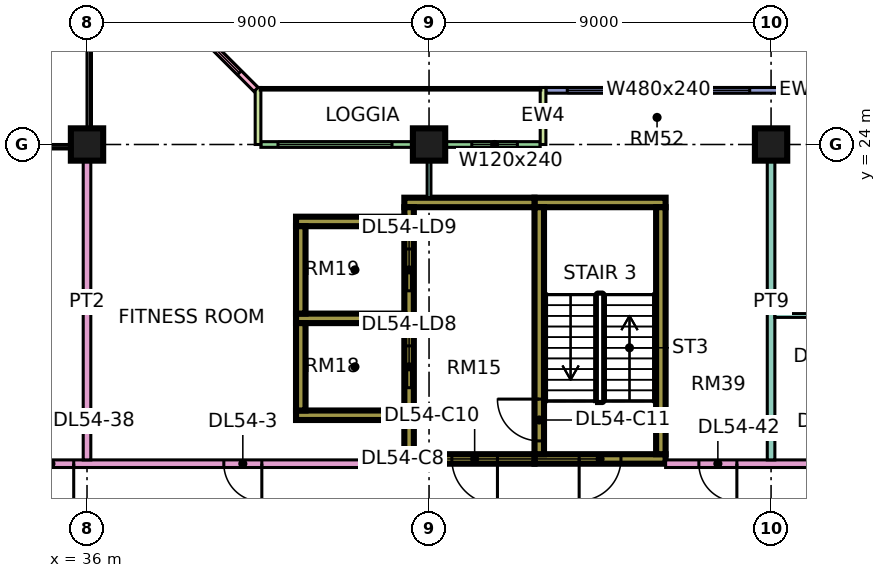
"""IFC4 building model, lengths in metres.
Left out: names, types, materials, properties, quantities, classifications, styles, units other than length and angle.
Written with IfcOpenShell. Run it as: python <this file> out.ifc"""

import sys

from ifc_helpers import new_model, si_unit, direction, frame, frame_2d, origin, origin_2d, place, context, subcontext, project, spatial, rectangle, extrude, element, fill, save


model = new_model("IFC4")
c1 = context("Model", 3, precision=1e-05, world=origin(), true_north=direction((0.0, 1.0)))
c2 = subcontext(c1, "Body", "Model", "MODEL_VIEW")
j1 = project(units=[si_unit("LENGTHUNIT", "METRE"), si_unit("PLANEANGLEUNIT", "RADIAN")], contexts=[c1])
p1 = place(None, origin())
s1 = spatial("IfcSite", under=j1, at=p1, CompositionType="ELEMENT")
p2 = place(p1, origin())
s2 = spatial("IfcBuilding", under=s1, at=p2, CompositionType="ELEMENT")
p3 = place(p2, frame((0.0, 0.0, 230.4)))
s3 = spatial("IfcBuildingStorey", under=s2, at=p3, CompositionType="ELEMENT", Elevation=230.4)
for number, where, z_axis, x_axis in (
    (1, (36.0, 24.0, 0.0), (0.0, 0.0, 1.0), (1.0, 0.0, 0.0)),
    (2, (45.0, 24.0, 0.0), (0.0, 0.0, 1.0), (1.0, 0.0, 0.0)),
    (3, (54.0, 24.0, 0.0), (0.0, 0.0, 1.0), (1.0, 0.0, 0.0)),
):
    element("IfcColumn", number, at=place(p3, frame(where, z_axis=z_axis, x_axis=x_axis)), inside=s3, PredefinedType="COLUMN", context=c2, shape_type="SweptSolid", body=[
        extrude(rectangle(XDim=0.85, YDim=0.85, at=origin_2d()), origin(), (0.0, 0.0, 1.0), 3.75),
    ])
p4 = place(p3, frame((47.775, 15.725, 0.0), z_axis=(0.0, 0.0, 1.0), x_axis=(1.0, 0.0, 0.0)))
e4 = element("IfcWall", 4, at=p4, inside=s3, PredefinedType="SHEAR", context=c2, shape_type="SweptSolid", body=[
    extrude(rectangle(XDim=3.45, YDim=0.25, at=frame_2d((1.725, 0.0))), origin(), (0.0, 0.0, 1.0), 3.75),
])
p5 = place(p4, frame((1.175, 0.0, 0.0)))
e5 = element("IfcOpeningElement", 5, at=p5, cuts=e4, PredefinedType="OPENING", context=c2, shape_type="SweptSolid", body=[
    extrude(rectangle(XDim=1.1, YDim=2.2, at=frame_2d((0.55, 1.1))), frame((0.0, 0.135, 0.0), z_axis=(0.0, -1.0, 0.0), x_axis=(1.0, 0.0, 0.0)), (0.0, 0.0, 1.0), 0.27),
])
p6 = place(p3, frame((47.775, 22.475, 0.0), z_axis=(0.0, 0.0, 1.0), x_axis=(1.0, 0.0, 0.0)))
e6 = element("IfcWall", 6, at=p6, inside=s3, PredefinedType="SHEAR", context=c2, shape_type="SweptSolid", body=[
    extrude(rectangle(XDim=3.45, YDim=0.25, at=frame_2d((1.725, 0.0))), origin(), (0.0, 0.0, 1.0), 3.75),
])
p7 = place(p3, frame((47.9, 15.85, 0.0), z_axis=(0.0, 0.0, 1.0), x_axis=(0.0, 1.0, 0.0)))
e7 = element("IfcWall", 7, at=p7, inside=s3, PredefinedType="SHEAR", context=c2, shape_type="SweptSolid", body=[
    extrude(rectangle(XDim=6.5, YDim=0.25, at=frame_2d((3.25, 0.0))), origin(), (0.0, 0.0, 1.0), 3.75),
])
p8 = place(p7, frame((0.35, 0.0, 0.0)))
e8 = element("IfcOpeningElement", 8, at=p8, cuts=e7, PredefinedType="OPENING", context=c2, shape_type="SweptSolid", body=[
    extrude(rectangle(XDim=1.1, YDim=2.2, at=frame_2d((0.55, 1.1))), frame((0.0, 0.135, 0.0), z_axis=(0.0, -1.0, 0.0), x_axis=(1.0, 0.0, 0.0)), (0.0, 0.0, 1.0), 0.27),
])
p9 = place(p3, frame((51.1, 15.85, 0.0), z_axis=(0.0, 0.0, 1.0), x_axis=(0.0, 1.0, 0.0)))
e9 = element("IfcWall", 9, at=p9, inside=s3, PredefinedType="SHEAR", context=c2, shape_type="SweptSolid", body=[
    extrude(rectangle(XDim=6.5, YDim=0.25, at=frame_2d((3.25, 0.0))), origin(), (0.0, 0.0, 1.0), 3.75),
])
p10 = place(p3, frame((44.35, 15.725, 0.0), z_axis=(0.0, 0.0, 1.0), x_axis=(1.0, 0.0, 0.0)))
e10 = element("IfcWall", 10, at=p10, inside=s3, PredefinedType="SHEAR", context=c2, shape_type="SweptSolid", body=[
    extrude(rectangle(XDim=3.425, YDim=0.25, at=frame_2d((1.712, 0.0))), origin(), (0.0, 0.0, 1.0), 3.75),
])
p11 = place(p10, frame((1.25, 0.0, 0.0)))
e11 = element("IfcOpeningElement", 11, at=p11, cuts=e10, PredefinedType="OPENING", context=c2, shape_type="SweptSolid", body=[
    extrude(rectangle(XDim=1.2, YDim=2.2, at=frame_2d((0.6, 1.1))), frame((0.0, 0.135, 0.0), z_axis=(0.0, -1.0, 0.0), x_axis=(1.0, 0.0, 0.0)), (0.0, 0.0, 1.0), 0.27),
])
p12 = place(p3, frame((44.35, 22.475, 0.0), z_axis=(0.0, 0.0, 1.0), x_axis=(1.0, 0.0, 0.0)))
e12 = element("IfcWall", 12, at=p12, inside=s3, PredefinedType="SHEAR", context=c2, shape_type="SweptSolid", body=[
    extrude(rectangle(XDim=3.425, YDim=0.25, at=frame_2d((1.712, 0.0))), origin(), (0.0, 0.0, 1.0), 3.75),
])
p13 = place(p3, frame((44.475, 15.85, 0.0), z_axis=(0.0, 0.0, 1.0), x_axis=(0.0, 1.0, 0.0)))
e13 = element("IfcWall", 13, at=p13, inside=s3, PredefinedType="SHEAR", context=c2, shape_type="SweptSolid", body=[
    extrude(rectangle(XDim=6.5, YDim=0.25, at=frame_2d((3.25, 0.0))), origin(), (0.0, 0.0, 1.0), 3.75),
])
p14 = place(p13, frame((1.75, 0.0, 0.0)))
e14 = element("IfcOpeningElement", 14, at=p14, cuts=e13, PredefinedType="OPENING", context=c2, shape_type="SweptSolid", body=[
    extrude(rectangle(XDim=1.1, YDim=2.2, at=frame_2d((0.55, 1.1))), frame((0.0, 0.135, 0.0), z_axis=(0.0, -1.0, 0.0), x_axis=(1.0, 0.0, 0.0)), (0.0, 0.0, 1.0), 0.27),
])
p15 = place(p13, frame((4.3, 0.0, 0.0)))
e15 = element("IfcOpeningElement", 15, at=p15, cuts=e13, PredefinedType="OPENING", context=c2, shape_type="SweptSolid", body=[
    extrude(rectangle(XDim=1.1, YDim=2.2, at=frame_2d((0.55, 1.1))), frame((0.0, 0.135, 0.0), z_axis=(0.0, -1.0, 0.0), x_axis=(1.0, 0.0, 0.0)), (0.0, 0.0, 1.0), 0.27),
])
for number, where, z_axis, x_axis in (
    (16, (41.5, 16.875, 0.0), (0.0, 0.0, 1.0), (1.0, 0.0, 0.0)),
    (17, (41.5, 19.425, 0.0), (0.0, 0.0, 1.0), (1.0, 0.0, 0.0)),
    (18, (41.5, 21.975, 0.0), (0.0, 0.0, 1.0), (1.0, 0.0, 0.0)),
):
    element("IfcWall", number, at=place(p3, frame(where, z_axis=z_axis, x_axis=x_axis)), inside=s3, PredefinedType="SHEAR", context=c2, shape_type="SweptSolid", body=[
        extrude(rectangle(XDim=2.85, YDim=0.25, at=frame_2d((1.425, 0.0))), origin(), (0.0, 0.0, 1.0), 3.75),
    ])
for number, where, z_axis, x_axis in (
    (19, (41.625, 17.0, 0.0), (0.0, 0.0, 1.0), (0.0, 1.0, 0.0)),
    (20, (41.625, 19.55, 0.0), (0.0, 0.0, 1.0), (0.0, 1.0, 0.0)),
):
    element("IfcWall", number, at=place(p3, frame(where, z_axis=z_axis, x_axis=x_axis)), inside=s3, PredefinedType="SHEAR", context=c2, shape_type="SweptSolid", body=[
        extrude(rectangle(XDim=2.3, YDim=0.25, at=frame_2d((1.15, 0.0))), origin(), (0.0, 0.0, 1.0), 3.75),
    ])
p16 = place(p3, frame((61.5, 25.425, 0.0), z_axis=(0.0, 0.0, 1.0), x_axis=(-1.0, 0.0, 0.0)))
e21 = element("IfcWall", 21, at=p16, inside=s3, PredefinedType="SOLIDWALL", context=c2, shape_type="SweptSolid", body=[
    extrude(rectangle(XDim=13.425, YDim=0.15, at=frame_2d((6.712, 0.0))), origin(), (0.0, 0.0, 1.0), 3.35),
])
p17 = place(p16, frame((2.1, 0.0, 0.45)))
e22 = element("IfcOpeningElement", 22, at=p17, cuts=e21, PredefinedType="OPENING", context=c2, shape_type="SweptSolid", body=[
    extrude(rectangle(XDim=1.8, YDim=2.4, at=frame_2d((0.9, 1.2))), frame((0.0, 0.085, 0.0), z_axis=(0.0, -1.0, 0.0), x_axis=(1.0, 0.0, 0.0)), (0.0, 0.0, 1.0), 0.17),
])
p18 = place(p16, frame((5.1, 0.0, 0.45)))
e23 = element("IfcOpeningElement", 23, at=p18, cuts=e21, PredefinedType="OPENING", context=c2, shape_type="SweptSolid", body=[
    extrude(rectangle(XDim=1.8, YDim=2.4, at=frame_2d((0.9, 1.2))), frame((0.0, 0.085, 0.0), z_axis=(0.0, -1.0, 0.0), x_axis=(1.0, 0.0, 0.0)), (0.0, 0.0, 1.0), 0.17),
])
p19 = place(p16, frame((8.062, 0.0, 0.45)))
e24 = element("IfcOpeningElement", 24, at=p19, cuts=e21, PredefinedType="OPENING", context=c2, shape_type="SweptSolid", body=[
    extrude(rectangle(XDim=4.8, YDim=2.4, at=frame_2d((2.4, 1.2))), frame((0.0, 0.085, 0.0), z_axis=(0.0, -1.0, 0.0), x_axis=(1.0, 0.0, 0.0)), (0.0, 0.0, 1.0), 0.17),
])
p20 = place(p3, frame((47.925, 24.0, 0.0), z_axis=(0.0, 0.0, 1.0), x_axis=(-1.0, 0.0, 0.0)))
e25 = element("IfcWall", 25, at=p20, inside=s3, PredefinedType="SOLIDWALL", context=c2, shape_type="SweptSolid", body=[
    extrude(rectangle(XDim=7.35, YDim=0.15, at=frame_2d((3.675, 0.0))), origin(), (0.0, 0.0, 1.0), 3.35),
])
p21 = place(p20, frame((0.6, 0.0, 0.45)))
e26 = element("IfcOpeningElement", 26, at=p21, cuts=e25, PredefinedType="OPENING", context=c2, shape_type="SweptSolid", body=[
    extrude(rectangle(XDim=1.2, YDim=2.4, at=frame_2d((0.6, 1.2))), frame((0.0, 0.085, 0.0), z_axis=(0.0, -1.0, 0.0), x_axis=(1.0, 0.0, 0.0)), (0.0, 0.0, 1.0), 0.17),
])
p22 = place(p20, frame((3.9, 0.0, 0.45)))
e27 = element("IfcOpeningElement", 27, at=p22, cuts=e25, PredefinedType="OPENING", context=c2, shape_type="SweptSolid", body=[
    extrude(rectangle(XDim=3.0, YDim=2.4, at=frame_2d((1.5, 1.2))), frame((0.0, 0.085, 0.0), z_axis=(0.0, -1.0, 0.0), x_axis=(1.0, 0.0, 0.0)), (0.0, 0.0, 1.0), 0.17),
])
for number, where, z_axis, x_axis in (
    (28, (48.0, 25.5, 0.0), (0.0, 0.0, 1.0), (0.0, -1.0, 0.0)),
    (29, (40.5, 25.5, 0.0), (0.0, 0.0, 1.0), (0.0, -1.0, 0.0)),
):
    element("IfcWall", number, at=place(p3, frame(where, z_axis=z_axis, x_axis=x_axis)), inside=s3, PredefinedType="SOLIDWALL", context=c2, shape_type="SweptSolid", body=[
        extrude(rectangle(XDim=1.5, YDim=0.15, at=frame_2d((0.75, 0.0))), origin(), (0.0, 0.0, 1.0), 3.35),
    ])
p23 = place(p3, frame((40.447, 25.447, 0.0), z_axis=(0.0, 0.0, 1.0), x_axis=(-0.707106781187, 0.707106781187, 0.0)))
e30 = element("IfcWall", 30, at=p23, inside=s3, PredefinedType="SOLIDWALL", context=c2, shape_type="SweptSolid", body=[
    extrude(rectangle(XDim=4.243, YDim=0.15, at=frame_2d((2.121, 0.0))), origin(), (0.0, 0.0, 1.0), 3.35),
])
p24 = place(p23, frame((0.621, 0.0, 0.45)))
e31 = element("IfcOpeningElement", 31, at=p24, cuts=e30, PredefinedType="OPENING", context=c2, shape_type="SweptSolid", body=[
    extrude(rectangle(XDim=3.0, YDim=2.4, at=frame_2d((1.5, 1.2))), frame((0.0, 0.085, 0.0), z_axis=(0.0, -1.0, 0.0), x_axis=(1.0, 0.0, 0.0)), (0.0, 0.0, 1.0), 0.17),
])
p25 = place(p3, frame((34.0, 15.6, 0.0), z_axis=(0.0, 0.0, 1.0), x_axis=(1.0, 0.0, 0.0)))
e32 = element("IfcWall", 32, at=p25, inside=s3, PredefinedType="PARTITIONING", context=c2, shape_type="SweptSolid", body=[
    extrude(rectangle(XDim=10.35, YDim=0.2, at=frame_2d((5.175, 0.0))), origin(), (0.0, 0.0, 1.0), 3.35),
])
p26 = place(p25, frame((5.6, 0.0, 0.0)))
e33 = element("IfcOpeningElement", 33, at=p26, cuts=e32, PredefinedType="OPENING", context=c2, shape_type="SweptSolid", body=[
    extrude(rectangle(XDim=1.0, YDim=2.1, at=frame_2d((0.5, 1.05))), frame((0.0, 0.11, 0.0), z_axis=(0.0, -1.0, 0.0), x_axis=(1.0, 0.0, 0.0)), (0.0, 0.0, 1.0), 0.22),
])
p27 = place(p25, frame((0.45, 0.0, 0.0)))
e34 = element("IfcOpeningElement", 34, at=p27, cuts=e32, PredefinedType="OPENING", context=c2, shape_type="SweptSolid", body=[
    extrude(rectangle(XDim=1.2, YDim=2.1, at=frame_2d((0.6, 1.05))), frame((0.0, 0.11, 0.0), z_axis=(0.0, -1.0, 0.0), x_axis=(1.0, 0.0, 0.0)), (0.0, 0.0, 1.0), 0.22),
])
p28 = place(p3, frame((36.0, 15.7, 0.0), z_axis=(0.0, 0.0, 1.0), x_axis=(0.0, 1.0, 0.0)))
e35 = element("IfcWall", 35, at=p28, inside=s3, PredefinedType="PARTITIONING", context=c2, shape_type="SweptSolid", body=[
    extrude(rectangle(XDim=8.3, YDim=0.2, at=frame_2d((4.15, 0.0))), origin(), (0.0, 0.0, 1.0), 3.35),
])
p29 = place(p3, frame((45.0, 22.6, 0.0), z_axis=(0.0, 0.0, 1.0), x_axis=(0.0, 1.0, 0.0)))
e36 = element("IfcWall", 36, at=p29, inside=s3, PredefinedType="PARTITIONING", context=c2, shape_type="SweptSolid", body=[
    extrude(rectangle(XDim=1.326, YDim=0.1, at=frame_2d((0.663, 0.0))), origin(), (0.0, 0.0, 1.0), 3.35),
])
p30 = place(p3, frame((51.225, 15.6, 0.0), z_axis=(0.0, 0.0, 1.0), x_axis=(1.0, 0.0, 0.0)))
e37 = element("IfcWall", 37, at=p30, inside=s3, PredefinedType="PARTITIONING", context=c2, shape_type="SweptSolid", body=[
    extrude(rectangle(XDim=11.701, YDim=0.2, at=frame_2d((5.851, 0.0))), origin(), (0.0, 0.0, 1.0), 3.35),
])
p31 = place(p30, frame((3.875, 0.0, 0.0)))
e38 = element("IfcOpeningElement", 38, at=p31, cuts=e37, PredefinedType="OPENING", context=c2, shape_type="SweptSolid", body=[
    extrude(rectangle(XDim=1.0, YDim=2.1, at=frame_2d((0.5, 1.05))), frame((0.0, 0.11, 0.0), z_axis=(0.0, -1.0, 0.0), x_axis=(1.0, 0.0, 0.0)), (0.0, 0.0, 1.0), 0.22),
])
p32 = place(p30, frame((0.875, 0.0, 0.0)))
e39 = element("IfcOpeningElement", 39, at=p32, cuts=e37, PredefinedType="OPENING", context=c2, shape_type="SweptSolid", body=[
    extrude(rectangle(XDim=1.0, YDim=2.1, at=frame_2d((0.5, 1.05))), frame((0.0, 0.11, 0.0), z_axis=(0.0, -1.0, 0.0), x_axis=(1.0, 0.0, 0.0)), (0.0, 0.0, 1.0), 0.22),
])
p33 = place(p3, frame((54.0, 15.7, 0.0), z_axis=(0.0, 0.0, 1.0), x_axis=(0.0, 1.0, 0.0)))
e40 = element("IfcWall", 40, at=p33, inside=s3, PredefinedType="PARTITIONING", context=c2, shape_type="SweptSolid", body=[
    extrude(rectangle(XDim=8.3, YDim=0.2, at=frame_2d((4.15, 0.0))), origin(), (0.0, 0.0, 1.0), 3.35),
])
p34 = place(p3, frame((54.1, 19.5, 0.0), z_axis=(0.0, 0.0, 1.0), x_axis=(1.0, 0.0, 0.0)))
e41 = element("IfcWall", 41, at=p34, inside=s3, PredefinedType="PARTITIONING", context=c2, shape_type="SweptSolid", body=[
    extrude(rectangle(XDim=5.95, YDim=0.1, at=frame_2d((2.975, 0.0))), origin(), (0.0, 0.0, 1.0), 3.35),
])
p35 = place(p34, frame((0.95, 0.0, 0.0)))
e42 = element("IfcOpeningElement", 42, at=p35, cuts=e41, PredefinedType="OPENING", context=c2, shape_type="SweptSolid", body=[
    extrude(rectangle(XDim=0.9, YDim=2.1, at=frame_2d((0.45, 1.05))), frame((0.0, 0.06, 0.0), z_axis=(0.0, -1.0, 0.0), x_axis=(1.0, 0.0, 0.0)), (0.0, 0.0, 1.0), 0.12),
])
p36 = place(p34, frame((3.95, 0.0, 0.0)))
e43 = element("IfcOpeningElement", 43, at=p36, cuts=e41, PredefinedType="OPENING", context=c2, shape_type="SweptSolid", body=[
    extrude(rectangle(XDim=0.9, YDim=2.1, at=frame_2d((0.45, 1.05))), frame((0.0, 0.06, 0.0), z_axis=(0.0, -1.0, 0.0), x_axis=(1.0, 0.0, 0.0)), (0.0, 0.0, 1.0), 0.12),
])
p37 = place(p18, origin())
e44 = element("IfcWindow", 44, at=p37, inside=s3, PartitioningType="SINGLE_PANEL", PredefinedType="WINDOW", context=c2, shape_type="SweptSolid", body=[
    extrude(rectangle(XDim=1.8, YDim=2.4, at=frame_2d((0.9, 1.2))), frame((0.0, 0.03, 0.0), z_axis=(0.0, -1.0, 0.0), x_axis=(1.0, 0.0, 0.0)), (0.0, 0.0, 1.0), 0.06),
])
fill(e23, e44)
p38 = place(p19, origin())
e45 = element("IfcWindow", 45, at=p38, inside=s3, PartitioningType="SINGLE_PANEL", PredefinedType="WINDOW", context=c2, shape_type="SweptSolid", body=[
    extrude(rectangle(XDim=4.8, YDim=2.4, at=frame_2d((2.4, 1.2))), frame((0.0, 0.03, 0.0), z_axis=(0.0, -1.0, 0.0), x_axis=(1.0, 0.0, 0.0)), (0.0, 0.0, 1.0), 0.06),
])
fill(e24, e45)
p39 = place(p21, origin())
e46 = element("IfcWindow", 46, at=p39, inside=s3, PartitioningType="SINGLE_PANEL", PredefinedType="WINDOW", context=c2, shape_type="SweptSolid", body=[
    extrude(rectangle(XDim=1.2, YDim=2.4, at=frame_2d((0.6, 1.2))), frame((0.0, 0.03, 0.0), z_axis=(0.0, -1.0, 0.0), x_axis=(1.0, 0.0, 0.0)), (0.0, 0.0, 1.0), 0.06),
])
fill(e26, e46)
p40 = place(p22, origin())
e47 = element("IfcWindow", 47, at=p40, inside=s3, PartitioningType="SINGLE_PANEL", PredefinedType="WINDOW", context=c2, shape_type="SweptSolid", body=[
    extrude(rectangle(XDim=3.0, YDim=2.4, at=frame_2d((1.5, 1.2))), frame((0.0, 0.03, 0.0), z_axis=(0.0, -1.0, 0.0), x_axis=(1.0, 0.0, 0.0)), (0.0, 0.0, 1.0), 0.06),
])
fill(e27, e47)
p41 = place(p24, origin())
e48 = element("IfcWindow", 48, at=p41, inside=s3, PartitioningType="SINGLE_PANEL", PredefinedType="WINDOW", context=c2, shape_type="SweptSolid", body=[
    extrude(rectangle(XDim=3.0, YDim=2.4, at=frame_2d((1.5, 1.2))), frame((0.0, 0.03, 0.0), z_axis=(0.0, -1.0, 0.0), x_axis=(1.0, 0.0, 0.0)), (0.0, 0.0, 1.0), 0.06),
])
fill(e31, e48)
p42 = place(p5, frame((1.1, 0.0, 0.0), z_axis=(0.0, 0.0, 1.0), x_axis=(-1.0, 0.0, 0.0)))
e49 = element("IfcDoor", 49, at=p42, inside=s3, OperationType="SINGLE_SWING_LEFT", PredefinedType="DOOR", context=c2, shape_type="SweptSolid", body=[
    extrude(rectangle(XDim=1.1, YDim=2.2, at=frame_2d((0.55, 1.1))), frame((0.0, 0.025, 0.0), z_axis=(0.0, -1.0, 0.0), x_axis=(1.0, 0.0, 0.0)), (0.0, 0.0, 1.0), 0.05),
])
fill(e5, e49)
p43 = place(p11, origin())
e50 = element("IfcDoor", 50, at=p43, inside=s3, OperationType="SINGLE_SWING_RIGHT", PredefinedType="DOOR", context=c2, shape_type="SweptSolid", body=[
    extrude(rectangle(XDim=1.2, YDim=2.2, at=frame_2d((0.6, 1.1))), frame((0.0, 0.025, 0.0), z_axis=(0.0, -1.0, 0.0), x_axis=(1.0, 0.0, 0.0)), (0.0, 0.0, 1.0), 0.05),
])
fill(e11, e50)
p44 = place(p8, frame((1.1, 0.0, 0.0), z_axis=(0.0, 0.0, 1.0), x_axis=(-1.0, 0.0, 0.0)))
e51 = element("IfcDoor", 51, at=p44, inside=s3, OperationType="SINGLE_SWING_RIGHT", PredefinedType="DOOR", context=c2, shape_type="SweptSolid", body=[
    extrude(rectangle(XDim=1.1, YDim=2.2, at=frame_2d((0.55, 1.1))), frame((0.0, 0.025, 0.0), z_axis=(0.0, -1.0, 0.0), x_axis=(1.0, 0.0, 0.0)), (0.0, 0.0, 1.0), 0.05),
])
fill(e8, e51)
p45 = place(p14, origin())
e52 = element("IfcDoor", 52, at=p45, inside=s3, OperationType="DOUBLE_DOOR_SLIDING", PredefinedType="DOOR", context=c2, shape_type="SweptSolid", body=[
    extrude(rectangle(XDim=1.1, YDim=2.2, at=frame_2d((0.55, 1.1))), frame((0.0, 0.025, 0.0), z_axis=(0.0, -1.0, 0.0), x_axis=(1.0, 0.0, 0.0)), (0.0, 0.0, 1.0), 0.05),
])
fill(e14, e52)
p46 = place(p15, origin())
e53 = element("IfcDoor", 53, at=p46, inside=s3, OperationType="DOUBLE_DOOR_SLIDING", PredefinedType="DOOR", context=c2, shape_type="SweptSolid", body=[
    extrude(rectangle(XDim=1.1, YDim=2.2, at=frame_2d((0.55, 1.1))), frame((0.0, 0.025, 0.0), z_axis=(0.0, -1.0, 0.0), x_axis=(1.0, 0.0, 0.0)), (0.0, 0.0, 1.0), 0.05),
])
fill(e15, e53)
p47 = place(p26, origin())
e54 = element("IfcDoor", 54, at=p47, inside=s3, OperationType="SINGLE_SWING_RIGHT", PredefinedType="DOOR", context=c2, shape_type="SweptSolid", body=[
    extrude(rectangle(XDim=1.0, YDim=2.1, at=frame_2d((0.5, 1.05))), frame((0.0, 0.025, 0.0), z_axis=(0.0, -1.0, 0.0), x_axis=(1.0, 0.0, 0.0)), (0.0, 0.0, 1.0), 0.05),
])
fill(e33, e54)
p48 = place(p27, origin())
e55 = element("IfcDoor", 55, at=p48, inside=s3, OperationType="SINGLE_SWING_RIGHT", PredefinedType="DOOR", context=c2, shape_type="SweptSolid", body=[
    extrude(rectangle(XDim=1.2, YDim=2.1, at=frame_2d((0.6, 1.05))), frame((0.0, 0.025, 0.0), z_axis=(0.0, -1.0, 0.0), x_axis=(1.0, 0.0, 0.0)), (0.0, 0.0, 1.0), 0.05),
])
fill(e34, e55)
p49 = place(p32, origin())
e56 = element("IfcDoor", 56, at=p49, inside=s3, OperationType="SINGLE_SWING_RIGHT", PredefinedType="DOOR", context=c2, shape_type="SweptSolid", body=[
    extrude(rectangle(XDim=1.0, YDim=2.1, at=frame_2d((0.5, 1.05))), frame((0.0, 0.025, 0.0), z_axis=(0.0, -1.0, 0.0), x_axis=(1.0, 0.0, 0.0)), (0.0, 0.0, 1.0), 0.05),
])
fill(e39, e56)
save(model, sys.argv[1])
